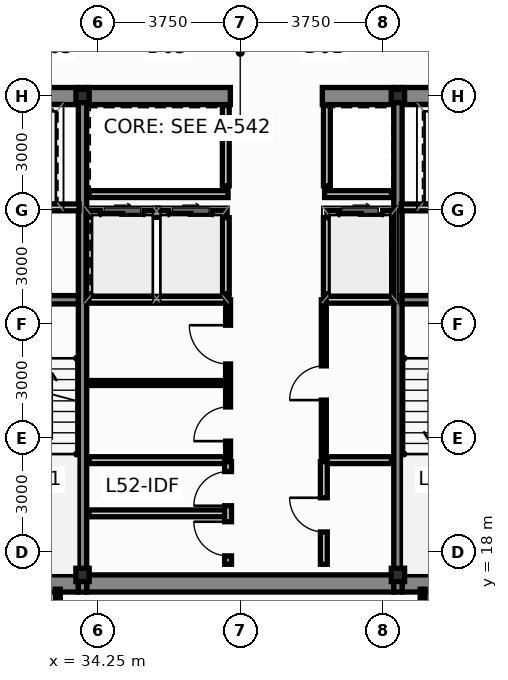
"""IFC4 building model, lengths in metres.
Left out: names, types, materials, properties, quantities, classifications, styles, units other than length and angle.
Written with IfcOpenShell. Run it as: python <this file> out.ifc"""

import sys

from ifc_helpers import new_model, si_unit, direction, frame, frame_2d, origin, origin_2d, place, context, subcontext, project, spatial, rectangle, hollow_rectangle, extrude, source, transform, mapped, element, fill, save


model = new_model("IFC4")
c1 = context("Model", 3, precision=1e-05, world=origin(), true_north=direction((0.0, 1.0)))
c2 = subcontext(c1, "Body", "Model", "MODEL_VIEW")
j1 = project(units=[si_unit("LENGTHUNIT", "METRE"), si_unit("PLANEANGLEUNIT", "RADIAN")], contexts=[c1])
p1 = place(None, origin())
s1 = spatial("IfcSite", under=j1, at=p1, CompositionType="ELEMENT")
p2 = place(p1, origin())
s2 = spatial("IfcBuilding", under=s1, at=p2, CompositionType="ELEMENT")
p3 = place(p2, frame((0.0, 0.0, 198.65)))
s3 = spatial("IfcBuildingStorey", under=s2, at=p3, CompositionType="ELEMENT", Elevation=198.65)
m1 = source(origin(), c2, "Body", "SweptSolid", [
    extrude(hollow_rectangle(XDim=0.35, YDim=0.35, WallThickness=0.016, at=origin_2d()), origin(), (0.0, 0.0, 1.0), 3.65),
])
for number, where, z_axis, x_axis in (
    (1, (33.85, 17.4, 0.0), (0.0, 0.0, 1.0), (1.0, 0.0, 0.0)),
    (2, (42.15, 17.4, 0.0), (0.0, 0.0, 1.0), (1.0, 0.0, 0.0)),
    (3, (33.85, 30.0, 0.0), (0.0, 0.0, 1.0), (1.0, 0.0, 0.0)),
    (4, (42.15, 30.0, 0.0), (0.0, 0.0, 1.0), (1.0, 0.0, 0.0)),
):
    element("IfcColumn", number, at=place(p3, frame(where, z_axis=z_axis, x_axis=x_axis)), inside=s3, PredefinedType="COLUMN", context=c2, shape_type="MappedRepresentation", body=[
        mapped(m1, transform((0.0, 0.0, 0.0), scale=1.0)),
    ])
p4 = place(p3, frame((30.84, 17.175, 0.0), z_axis=(0.0, 0.0, 1.0), x_axis=(1.0, 0.0, 0.0)))
e5 = element("IfcWall", 5, at=p4, inside=s3, PredefinedType="SHEAR", context=c2, shape_type="SweptSolid", body=[
    extrude(rectangle(XDim=2.9, YDim=0.45, at=frame_2d((1.45, 0.0))), origin(), (0.0, 0.0, 1.0), 3.65),
])
p5 = place(p3, frame((33.96, 17.175, 0.0), z_axis=(0.0, 0.0, 1.0), x_axis=(1.0, 0.0, 0.0)))
e6 = element("IfcWall", 6, at=p5, inside=s3, PredefinedType="SHEAR", context=c2, shape_type="SweptSolid", body=[
    extrude(rectangle(XDim=8.08, YDim=0.45, at=frame_2d((4.04, 0.0))), origin(), (0.0, 0.0, 1.0), 3.65),
])
for number, where, z_axis, x_axis in (
    (7, (42.26, 17.175, 0.0), (0.0, 0.0, 1.0), (1.0, 0.0, 0.0)),
    (8, (30.84, 30.0, 0.0), (0.0, 0.0, 1.0), (1.0, 0.0, 0.0)),
):
    element("IfcWall", number, at=place(p3, frame(where, z_axis=z_axis, x_axis=x_axis)), inside=s3, PredefinedType="SHEAR", context=c2, shape_type="SweptSolid", body=[
        extrude(rectangle(XDim=2.9, YDim=0.45, at=frame_2d((1.45, 0.0))), origin(), (0.0, 0.0, 1.0), 3.65),
    ])
p6 = place(p3, frame((33.96, 30.0, 0.0), z_axis=(0.0, 0.0, 1.0), x_axis=(1.0, 0.0, 0.0)))
e9 = element("IfcWall", 9, at=p6, inside=s3, PredefinedType="SHEAR", context=c2, shape_type="SweptSolid", body=[
    extrude(rectangle(XDim=3.78, YDim=0.45, at=frame_2d((1.89, 0.0))), origin(), (0.0, 0.0, 1.0), 3.65),
])
p7 = place(p3, frame((40.16, 30.0, 0.0), z_axis=(0.0, 0.0, 1.0), x_axis=(1.0, 0.0, 0.0)))
e10 = element("IfcWall", 10, at=p7, inside=s3, PredefinedType="SHEAR", context=c2, shape_type="SweptSolid", body=[
    extrude(rectangle(XDim=1.88, YDim=0.45, at=frame_2d((0.94, 0.0))), origin(), (0.0, 0.0, 1.0), 3.65),
])
p8 = place(p3, frame((42.26, 30.0, 0.0), z_axis=(0.0, 0.0, 1.0), x_axis=(1.0, 0.0, 0.0)))
e11 = element("IfcWall", 11, at=p8, inside=s3, PredefinedType="SHEAR", context=c2, shape_type="SweptSolid", body=[
    extrude(rectangle(XDim=2.9, YDim=0.45, at=frame_2d((1.45, 0.0))), origin(), (0.0, 0.0, 1.0), 3.65),
])
for number, where, z_axis, x_axis in (
    (12, (33.85, 16.95, 0.0), (0.0, 0.0, 1.0), (0.0, 1.0, 0.0)),
    (13, (42.15, 16.95, 0.0), (0.0, 0.0, 1.0), (0.0, 1.0, 0.0)),
):
    element("IfcWall", number, at=place(p3, frame(where, z_axis=z_axis, x_axis=x_axis)), inside=s3, PredefinedType="SHEAR", context=c2, shape_type="SweptSolid", body=[
        extrude(rectangle(XDim=13.275, YDim=0.22, at=frame_2d((6.638, 0.0))), origin(), (0.0, 0.0, 1.0), 3.65),
    ])
for number, where, z_axis, x_axis in (
    (14, (30.84, 24.64, 0.0), (0.0, 0.0, 1.0), (1.0, 0.0, 0.0)),
    (15, (42.26, 24.64, 0.0), (0.0, 0.0, 1.0), (1.0, 0.0, 0.0)),
):
    element("IfcWall", number, at=place(p3, frame(where, z_axis=z_axis, x_axis=x_axis)), inside=s3, PredefinedType="SHEAR", context=c2, shape_type="SweptSolid", body=[
        extrude(rectangle(XDim=2.9, YDim=0.22, at=frame_2d((1.45, 0.0))), origin(), (0.0, 0.0, 1.0), 3.65),
    ])
p9 = place(p3, frame((34.02, 26.9, 0.0), z_axis=(0.0, 0.0, 1.0), x_axis=(1.0, 0.0, 0.0)))
e16 = element("IfcWall", 16, at=p9, inside=s3, PredefinedType="PARTITIONING", context=c2, shape_type="SweptSolid", body=[
    extrude(rectangle(XDim=3.6, YDim=0.18, at=frame_2d((1.8, 0.0))), origin(), (0.0, 0.0, 1.0), 3.4),
])
p10 = place(p9, frame((0.3, 0.0, 0.0)))
e17 = element("IfcOpeningElement", 17, at=p10, cuts=e16, PredefinedType="OPENING", context=c2, shape_type="SweptSolid", body=[
    extrude(rectangle(XDim=1.15, YDim=2.2, at=frame_2d((0.575, 1.1))), frame((0.0, 0.102, 0.0), z_axis=(0.0, -1.0, 0.0), x_axis=(1.0, 0.0, 0.0)), (0.0, 0.0, 1.0), 0.204),
])
p11 = place(p9, frame((2.1, 0.0, 0.0)))
e18 = element("IfcOpeningElement", 18, at=p11, cuts=e16, PredefinedType="OPENING", context=c2, shape_type="SweptSolid", body=[
    extrude(rectangle(XDim=1.15, YDim=2.2, at=frame_2d((0.575, 1.1))), frame((0.0, 0.102, 0.0), z_axis=(0.0, -1.0, 0.0), x_axis=(1.0, 0.0, 0.0)), (0.0, 0.0, 1.0), 0.204),
])
p12 = place(p3, frame((40.28, 26.9, 0.0), z_axis=(0.0, 0.0, 1.0), x_axis=(1.0, 0.0, 0.0)))
e19 = element("IfcWall", 19, at=p12, inside=s3, PredefinedType="PARTITIONING", context=c2, shape_type="SweptSolid", body=[
    extrude(rectangle(XDim=1.7, YDim=0.18, at=frame_2d((0.85, 0.0))), origin(), (0.0, 0.0, 1.0), 3.4),
])
p13 = place(p12, frame((0.32, 0.0, 0.0)))
e20 = element("IfcOpeningElement", 20, at=p13, cuts=e19, PredefinedType="OPENING", context=c2, shape_type="SweptSolid", body=[
    extrude(rectangle(XDim=1.15, YDim=2.2, at=frame_2d((0.575, 1.1))), frame((0.0, 0.102, 0.0), z_axis=(0.0, -1.0, 0.0), x_axis=(1.0, 0.0, 0.0)), (0.0, 0.0, 1.0), 0.204),
])
for number, where, z_axis, x_axis in (
    (21, (37.62, 24.8, 0.0), (0.0, 0.0, 1.0), (0.0, 1.0, 0.0)),
    (22, (40.28, 24.8, 0.0), (0.0, 0.0, 1.0), (0.0, 1.0, 0.0)),
):
    element("IfcWall", number, at=place(p3, frame(where, z_axis=z_axis, x_axis=x_axis)), inside=s3, PredefinedType="PARTITIONING", context=c2, shape_type="SweptSolid", body=[
        extrude(rectangle(XDim=2.0, YDim=0.18, at=frame_2d((1.0, 0.0))), origin(), (0.0, 0.0, 1.0), 3.4),
    ])
p14 = place(p3, frame((34.02, 24.64, 0.0), z_axis=(0.0, 0.0, 1.0), x_axis=(1.0, 0.0, 0.0)))
e23 = element("IfcWall", 23, at=p14, inside=s3, PredefinedType="PARTITIONING", context=c2, shape_type="SweptSolid", body=[
    extrude(rectangle(XDim=3.68, YDim=0.18, at=frame_2d((1.84, 0.0))), origin(), (0.0, 0.0, 1.0), 3.4),
])
p15 = place(p3, frame((40.2, 24.64, 0.0), z_axis=(0.0, 0.0, 1.0), x_axis=(1.0, 0.0, 0.0)))
e24 = element("IfcWall", 24, at=p15, inside=s3, PredefinedType="PARTITIONING", context=c2, shape_type="SweptSolid", body=[
    extrude(rectangle(XDim=1.78, YDim=0.18, at=frame_2d((0.89, 0.0))), origin(), (0.0, 0.0, 1.0), 3.4),
])
p16 = place(p3, frame((34.02, 27.42, 0.0), z_axis=(0.0, 0.0, 1.0), x_axis=(1.0, 0.0, 0.0)))
e25 = element("IfcWall", 25, at=p16, inside=s3, PredefinedType="PARTITIONING", context=c2, shape_type="SweptSolid", body=[
    extrude(rectangle(XDim=3.66, YDim=0.18, at=frame_2d((1.83, 0.0))), origin(), (0.0, 0.0, 1.0), 3.4),
])
p17 = place(p3, frame((40.22, 27.42, 0.0), z_axis=(0.0, 0.0, 1.0), x_axis=(1.0, 0.0, 0.0)))
e26 = element("IfcWall", 26, at=p17, inside=s3, PredefinedType="PARTITIONING", context=c2, shape_type="SweptSolid", body=[
    extrude(rectangle(XDim=1.76, YDim=0.18, at=frame_2d((0.88, 0.0))), origin(), (0.0, 0.0, 1.0), 3.4),
])
for number, where, z_axis, x_axis in (
    (27, (37.62, 27.64, 0.0), (0.0, 0.0, 1.0), (0.0, 1.0, 0.0)),
    (28, (40.28, 27.64, 0.0), (0.0, 0.0, 1.0), (0.0, 1.0, 0.0)),
):
    element("IfcWall", number, at=place(p3, frame(where, z_axis=z_axis, x_axis=x_axis)), inside=s3, PredefinedType="PARTITIONING", context=c2, shape_type="SweptSolid", body=[
        extrude(rectangle(XDim=2.11, YDim=0.18, at=frame_2d((1.055, 0.0))), origin(), (0.0, 0.0, 1.0), 3.4),
    ])
for number, where, z_axis, x_axis in (
    (29, (30.86, 27.07, 0.0), (0.0, 0.0, 1.0), (1.0, 0.0, 0.0)),
    (30, (42.24, 27.07, 0.0), (0.0, 0.0, 1.0), (1.0, 0.0, 0.0)),
):
    element("IfcWall", number, at=place(p3, frame(where, z_axis=z_axis, x_axis=x_axis)), inside=s3, PredefinedType="PARTITIONING", context=c2, shape_type="SweptSolid", body=[
        extrude(rectangle(XDim=2.9, YDim=0.18, at=frame_2d((1.45, 0.0))), origin(), (0.0, 0.0, 1.0), 3.4),
    ])
p18 = place(p3, frame((34.02, 20.42, 0.0), z_axis=(0.0, 0.0, 1.0), x_axis=(1.0, 0.0, 0.0)))
e31 = element("IfcWall", 31, at=p18, inside=s3, PredefinedType="PARTITIONING", context=c2, shape_type="SweptSolid", body=[
    extrude(rectangle(XDim=3.64, YDim=0.18, at=frame_2d((1.82, 0.0))), origin(), (0.0, 0.0, 1.0), 3.4),
])
p19 = place(p3, frame((40.22, 20.42, 0.0), z_axis=(0.0, 0.0, 1.0), x_axis=(1.0, 0.0, 0.0)))
e32 = element("IfcWall", 32, at=p19, inside=s3, PredefinedType="PARTITIONING", context=c2, shape_type="SweptSolid", body=[
    extrude(rectangle(XDim=1.76, YDim=0.18, at=frame_2d((0.88, 0.0))), origin(), (0.0, 0.0, 1.0), 3.4),
])
p20 = place(p3, frame((34.02, 22.45, 0.0), z_axis=(0.0, 0.0, 1.0), x_axis=(1.0, 0.0, 0.0)))
e33 = element("IfcWall", 33, at=p20, inside=s3, PredefinedType="PARTITIONING", context=c2, shape_type="SweptSolid", body=[
    extrude(rectangle(XDim=3.58, YDim=0.13, at=frame_2d((1.79, 0.0))), origin(), (0.0, 0.0, 1.0), 3.4),
])
p21 = place(p3, frame((37.68, 20.5, 0.0), z_axis=(0.0, 0.0, 1.0), x_axis=(0.0, 1.0, 0.0)))
e34 = element("IfcWall", 34, at=p21, inside=s3, PredefinedType="PARTITIONING", context=c2, shape_type="SweptSolid", body=[
    extrude(rectangle(XDim=4.14, YDim=0.13, at=frame_2d((2.07, 0.0))), origin(), (0.0, 0.0, 1.0), 3.4),
])
p22 = place(p21, frame((0.42, 0.0, 0.0)))
e35 = element("IfcOpeningElement", 35, at=p22, cuts=e34, PredefinedType="OPENING", context=c2, shape_type="SweptSolid", body=[
    extrude(rectangle(XDim=0.9, YDim=2.1, at=frame_2d((0.45, 1.05))), frame((0.0, 0.077, 0.0), z_axis=(0.0, -1.0, 0.0), x_axis=(1.0, 0.0, 0.0)), (0.0, 0.0, 1.0), 0.154),
])
p23 = place(p21, frame((2.45, 0.0, 0.0)))
e36 = element("IfcOpeningElement", 36, at=p23, cuts=e34, PredefinedType="OPENING", context=c2, shape_type="SweptSolid", body=[
    extrude(rectangle(XDim=1.02, YDim=2.15, at=frame_2d((0.51, 1.075))), frame((0.0, 0.077, 0.0), z_axis=(0.0, -1.0, 0.0), x_axis=(1.0, 0.0, 0.0)), (0.0, 0.0, 1.0), 0.154),
])
p24 = place(p3, frame((40.2, 20.5, 0.0), z_axis=(0.0, 0.0, 1.0), x_axis=(0.0, 1.0, 0.0)))
e37 = element("IfcWall", 37, at=p24, inside=s3, PredefinedType="PARTITIONING", context=c2, shape_type="SweptSolid", body=[
    extrude(rectangle(XDim=4.14, YDim=0.13, at=frame_2d((2.07, 0.0))), origin(), (0.0, 0.0, 1.0), 3.4),
])
p25 = place(p24, frame((1.5, 0.0, 0.0)))
e38 = element("IfcOpeningElement", 38, at=p25, cuts=e37, PredefinedType="OPENING", context=c2, shape_type="SweptSolid", body=[
    extrude(rectangle(XDim=0.9, YDim=2.1, at=frame_2d((0.45, 1.05))), frame((0.0, 0.077, 0.0), z_axis=(0.0, -1.0, 0.0), x_axis=(1.0, 0.0, 0.0)), (0.0, 0.0, 1.0), 0.154),
])
p26 = place(p3, frame((34.02, 19.02, 0.0), z_axis=(0.0, 0.0, 1.0), x_axis=(1.0, 0.0, 0.0)))
e39 = element("IfcWall", 39, at=p26, inside=s3, PredefinedType="PARTITIONING", context=c2, shape_type="SweptSolid", body=[
    extrude(rectangle(XDim=3.58, YDim=0.18, at=frame_2d((1.79, 0.0))), origin(), (0.0, 0.0, 1.0), 3.4),
])
p27 = place(p3, frame((37.68, 17.68, 0.0), z_axis=(0.0, 0.0, 1.0), x_axis=(0.0, 1.0, 0.0)))
e40 = element("IfcWall", 40, at=p27, inside=s3, PredefinedType="PARTITIONING", context=c2, shape_type="SweptSolid", body=[
    extrude(rectangle(XDim=2.7, YDim=0.18, at=frame_2d((1.35, 0.0))), origin(), (0.0, 0.0, 1.0), 3.4),
])
p28 = place(p27, frame((0.22, 0.0, 0.0)))
e41 = element("IfcOpeningElement", 41, at=p28, cuts=e40, PredefinedType="OPENING", context=c2, shape_type="SweptSolid", body=[
    extrude(rectangle(XDim=0.9, YDim=2.1, at=frame_2d((0.45, 1.05))), frame((0.0, 0.102, 0.0), z_axis=(0.0, -1.0, 0.0), x_axis=(1.0, 0.0, 0.0)), (0.0, 0.0, 1.0), 0.204),
])
p29 = place(p27, frame((1.54, 0.0, 0.0)))
e42 = element("IfcOpeningElement", 42, at=p29, cuts=e40, PredefinedType="OPENING", context=c2, shape_type="SweptSolid", body=[
    extrude(rectangle(XDim=0.9, YDim=2.1, at=frame_2d((0.45, 1.05))), frame((0.0, 0.102, 0.0), z_axis=(0.0, -1.0, 0.0), x_axis=(1.0, 0.0, 0.0)), (0.0, 0.0, 1.0), 0.204),
])
p30 = place(p3, frame((40.2, 17.68, 0.0), z_axis=(0.0, 0.0, 1.0), x_axis=(0.0, 1.0, 0.0)))
e43 = element("IfcWall", 43, at=p30, inside=s3, PredefinedType="PARTITIONING", context=c2, shape_type="SweptSolid", body=[
    extrude(rectangle(XDim=2.7, YDim=0.18, at=frame_2d((1.35, 0.0))), origin(), (0.0, 0.0, 1.0), 3.4),
])
p31 = place(p30, frame((0.85, 0.0, 0.0)))
e44 = element("IfcOpeningElement", 44, at=p31, cuts=e43, PredefinedType="OPENING", context=c2, shape_type="SweptSolid", body=[
    extrude(rectangle(XDim=0.9, YDim=2.1, at=frame_2d((0.45, 1.05))), frame((0.0, 0.102, 0.0), z_axis=(0.0, -1.0, 0.0), x_axis=(1.0, 0.0, 0.0)), (0.0, 0.0, 1.0), 0.204),
])
p32 = place(p3, frame((33.2, 14.735, 0.0), z_axis=(0.0, 0.0, 1.0), x_axis=(0.0, 1.0, 0.0)))
e45 = element("IfcWall", 45, at=p32, inside=s3, PredefinedType="PARTITIONING", context=c2, shape_type="SweptSolid", body=[
    extrude(rectangle(XDim=2.29, YDim=0.13, at=frame_2d((1.145, 0.0))), origin(), (0.0, 0.0, 1.0), 3.4),
])
p33 = place(p32, frame((0.665, 0.0, 0.0)))
e46 = element("IfcOpeningElement", 46, at=p33, cuts=e45, PredefinedType="OPENING", context=c2, shape_type="SweptSolid", body=[
    extrude(rectangle(XDim=0.96, YDim=2.15, at=frame_2d((0.48, 1.075))), frame((0.0, 0.077, 0.0), z_axis=(0.0, -1.0, 0.0), x_axis=(1.0, 0.0, 0.0)), (0.0, 0.0, 1.0), 0.154),
])
p34 = place(p3, frame((42.8, 14.735, 0.0), z_axis=(0.0, 0.0, 1.0), x_axis=(0.0, 1.0, 0.0)))
e47 = element("IfcWall", 47, at=p34, inside=s3, PredefinedType="PARTITIONING", context=c2, shape_type="SweptSolid", body=[
    extrude(rectangle(XDim=2.29, YDim=0.13, at=frame_2d((1.145, 0.0))), origin(), (0.0, 0.0, 1.0), 3.4),
])
p35 = place(p10, origin())
e48 = element("IfcDoor", 48, at=p35, inside=s3, OperationType="SLIDING_TO_LEFT", PredefinedType="DOOR", context=c2, shape_type="SweptSolid", body=[
    extrude(rectangle(XDim=1.15, YDim=2.2, at=frame_2d((0.575, 1.1))), frame((0.0, 0.025, 0.0), z_axis=(0.0, -1.0, 0.0), x_axis=(1.0, 0.0, 0.0)), (0.0, 0.0, 1.0), 0.05),
])
fill(e17, e48)
p36 = place(p11, origin())
e49 = element("IfcDoor", 49, at=p36, inside=s3, OperationType="SLIDING_TO_RIGHT", PredefinedType="DOOR", context=c2, shape_type="SweptSolid", body=[
    extrude(rectangle(XDim=1.15, YDim=2.2, at=frame_2d((0.575, 1.1))), frame((0.0, 0.025, 0.0), z_axis=(0.0, -1.0, 0.0), x_axis=(1.0, 0.0, 0.0)), (0.0, 0.0, 1.0), 0.05),
])
fill(e18, e49)
p37 = place(p13, origin())
e50 = element("IfcDoor", 50, at=p37, inside=s3, OperationType="SLIDING_TO_LEFT", PredefinedType="DOOR", context=c2, shape_type="SweptSolid", body=[
    extrude(rectangle(XDim=1.15, YDim=2.2, at=frame_2d((0.575, 1.1))), frame((0.0, 0.025, 0.0), z_axis=(0.0, -1.0, 0.0), x_axis=(1.0, 0.0, 0.0)), (0.0, 0.0, 1.0), 0.05),
])
fill(e20, e50)
p38 = place(p22, origin())
e51 = element("IfcDoor", 51, at=p38, inside=s3, OperationType="SINGLE_SWING_LEFT", PredefinedType="DOOR", context=c2, shape_type="SweptSolid", body=[
    extrude(rectangle(XDim=0.9, YDim=2.1, at=frame_2d((0.45, 1.05))), frame((0.0, 0.025, 0.0), z_axis=(0.0, -1.0, 0.0), x_axis=(1.0, 0.0, 0.0)), (0.0, 0.0, 1.0), 0.05),
])
fill(e35, e51)
p39 = place(p23, origin())
e52 = element("IfcDoor", 52, at=p39, inside=s3, OperationType="SINGLE_SWING_RIGHT", PredefinedType="DOOR", context=c2, shape_type="SweptSolid", body=[
    extrude(rectangle(XDim=1.02, YDim=2.15, at=frame_2d((0.51, 1.075))), frame((0.0, 0.025, 0.0), z_axis=(0.0, -1.0, 0.0), x_axis=(1.0, 0.0, 0.0)), (0.0, 0.0, 1.0), 0.05),
])
fill(e36, e52)
p40 = place(p25, origin())
e53 = element("IfcDoor", 53, at=p40, inside=s3, OperationType="SINGLE_SWING_LEFT", PredefinedType="DOOR", context=c2, shape_type="SweptSolid", body=[
    extrude(rectangle(XDim=0.9, YDim=2.1, at=frame_2d((0.45, 1.05))), frame((0.0, 0.025, 0.0), z_axis=(0.0, -1.0, 0.0), x_axis=(1.0, 0.0, 0.0)), (0.0, 0.0, 1.0), 0.05),
])
fill(e38, e53)
p41 = place(p28, origin())
e54 = element("IfcDoor", 54, at=p41, inside=s3, OperationType="SINGLE_SWING_RIGHT", PredefinedType="DOOR", context=c2, shape_type="SweptSolid", body=[
    extrude(rectangle(XDim=0.9, YDim=2.1, at=frame_2d((0.45, 1.05))), frame((0.0, 0.025, 0.0), z_axis=(0.0, -1.0, 0.0), x_axis=(1.0, 0.0, 0.0)), (0.0, 0.0, 1.0), 0.05),
])
fill(e41, e54)
p42 = place(p29, origin())
e55 = element("IfcDoor", 55, at=p42, inside=s3, OperationType="SINGLE_SWING_LEFT", PredefinedType="DOOR", context=c2, shape_type="SweptSolid", body=[
    extrude(rectangle(XDim=0.9, YDim=2.1, at=frame_2d((0.45, 1.05))), frame((0.0, 0.025, 0.0), z_axis=(0.0, -1.0, 0.0), x_axis=(1.0, 0.0, 0.0)), (0.0, 0.0, 1.0), 0.05),
])
fill(e42, e55)
p43 = place(p31, origin())
e56 = element("IfcDoor", 56, at=p43, inside=s3, OperationType="SINGLE_SWING_RIGHT", PredefinedType="DOOR", context=c2, shape_type="SweptSolid", body=[
    extrude(rectangle(XDim=0.9, YDim=2.1, at=frame_2d((0.45, 1.05))), frame((0.0, 0.025, 0.0), z_axis=(0.0, -1.0, 0.0), x_axis=(1.0, 0.0, 0.0)), (0.0, 0.0, 1.0), 0.05),
])
fill(e44, e56)
save(model, sys.argv[1])
